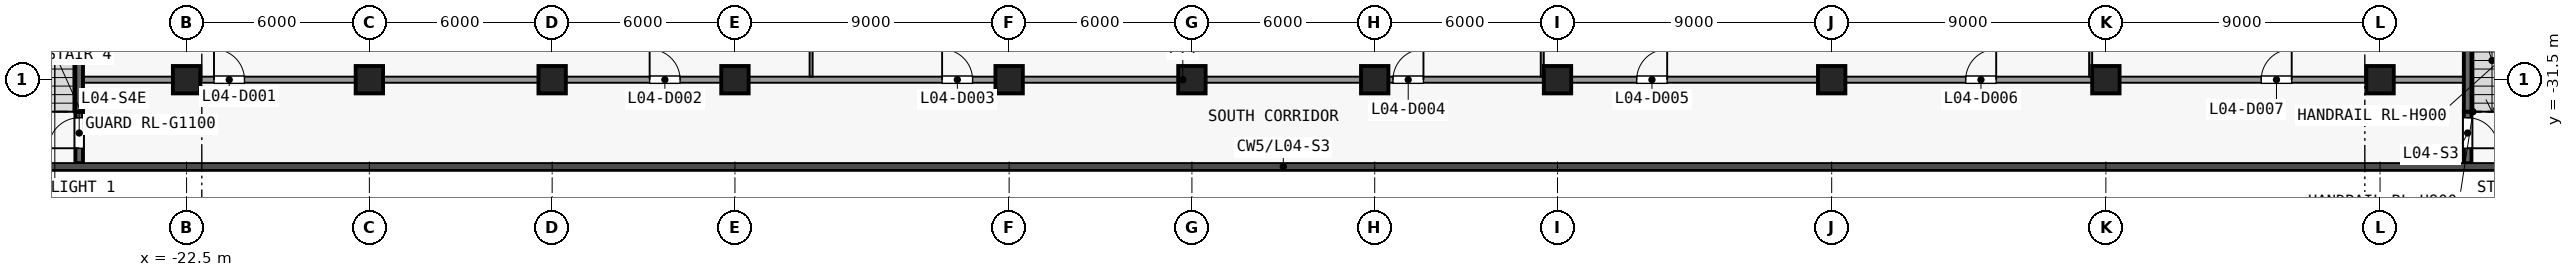
"""IFC4 building model, lengths in metres.
Left out: names, types, materials, properties, quantities, classifications, styles, units other than length and angle.
Written with IfcOpenShell. Run it as: python <this file> out.ifc"""

import sys

from ifc_helpers import new_model, si_unit, direction, frame, frame_2d, origin, origin_2d, place, context, subcontext, project, spatial, rectangle, extrude, element, fill, save


model = new_model("IFC4")
c1 = context("Model", 3, precision=1e-05, world=origin(), true_north=direction((0.0, 1.0)))
c2 = subcontext(c1, "Body", "Model", "MODEL_VIEW")
j1 = project(units=[si_unit("LENGTHUNIT", "METRE"), si_unit("PLANEANGLEUNIT", "RADIAN")], contexts=[c1])
p1 = place(None, origin())
s1 = spatial("IfcSite", under=j1, at=p1, CompositionType="ELEMENT")
p2 = place(p1, origin())
s2 = spatial("IfcBuilding", under=s1, at=p2, CompositionType="ELEMENT")
p3 = place(p2, frame((0.0, 0.0, 23.5)))
s3 = spatial("IfcBuildingStorey", under=s2, at=p3, CompositionType="ELEMENT", Elevation=23.5)
for number, where, z_axis, x_axis in (
    (1, (-22.5, -31.5, 0.0), (0.0, 0.0, 1.0), (1.0, 0.0, 0.0)),
    (2, (-16.5, -31.5, 0.0), (0.0, 0.0, 1.0), (1.0, 0.0, 0.0)),
    (3, (-10.5, -31.5, 0.0), (0.0, 0.0, 1.0), (1.0, 0.0, 0.0)),
    (4, (-4.5, -31.5, 0.0), (0.0, 0.0, 1.0), (1.0, 0.0, 0.0)),
    (5, (4.5, -31.5, 0.0), (0.0, 0.0, 1.0), (1.0, 0.0, 0.0)),
    (6, (10.5, -31.5, 0.0), (0.0, 0.0, 1.0), (1.0, 0.0, 0.0)),
    (7, (16.5, -31.5, 0.0), (0.0, 0.0, 1.0), (1.0, 0.0, 0.0)),
    (8, (22.5, -31.5, 0.0), (0.0, 0.0, 1.0), (1.0, 0.0, 0.0)),
    (9, (31.5, -31.5, 0.0), (0.0, 0.0, 1.0), (1.0, 0.0, 0.0)),
    (10, (40.5, -31.5, 0.0), (0.0, 0.0, 1.0), (1.0, 0.0, 0.0)),
    (11, (49.5, -31.5, 0.0), (0.0, 0.0, 1.0), (1.0, 0.0, 0.0)),
):
    element("IfcColumn", number, at=place(p3, frame(where, z_axis=z_axis, x_axis=x_axis)), inside=s3, PredefinedType="COLUMN", context=c2, shape_type="SweptSolid", body=[
        extrude(rectangle(XDim=0.9, YDim=0.9, at=origin_2d()), origin(), (0.0, 0.0, 1.0), 4.5),
    ])
p4 = place(p3, frame((52.375, -32.55, 0.0), z_axis=(0.0, 0.0, 1.0), x_axis=(0.0, -1.0, 0.0)))
e12 = element("IfcWall", 12, at=p4, inside=s3, PredefinedType="SHEAR", context=c2, shape_type="SweptSolid", body=[
    extrude(rectangle(XDim=1.69, YDim=0.25, at=frame_2d((0.845, 0.0))), origin(), (0.0, 0.0, 1.0), 4.15),
])
p5 = place(p4, frame((0.2, 0.0, 0.0)))
e13 = element("IfcOpeningElement", 13, at=p5, cuts=e12, PredefinedType="OPENING", context=c2, shape_type="SweptSolid", body=[
    extrude(rectangle(XDim=1.0, YDim=2.1, at=frame_2d((0.5, 1.05))), frame((0.0, 0.135, 0.0), z_axis=(0.0, -1.0, 0.0), x_axis=(1.0, 0.0, 0.0)), (0.0, 0.0, 1.0), 0.27),
])
p6 = place(p3, frame((52.375, -32.55, 0.0), z_axis=(0.0, 0.0, 1.0), x_axis=(0.0, 1.0, 0.0)))
e14 = element("IfcWall", 14, at=p6, inside=s3, PredefinedType="SHEAR", context=c2, shape_type="SweptSolid", body=[
    extrude(rectangle(XDim=5.48, YDim=0.25, at=frame_2d((2.74, 0.0))), origin(), (0.0, 0.0, 1.0), 4.15),
])
p7 = place(p3, frame((-26.025, -34.24, 0.0), z_axis=(0.0, 0.0, 1.0), x_axis=(0.0, 1.0, 0.0)))
e15 = element("IfcWall", 15, at=p7, inside=s3, PredefinedType="SHEAR", context=c2, shape_type="SweptSolid", body=[
    extrude(rectangle(XDim=1.69, YDim=0.25, at=frame_2d((0.845, 0.0))), origin(), (0.0, 0.0, 1.0), 4.15),
])
p8 = place(p7, frame((0.49, 0.0, 0.0)))
e16 = element("IfcOpeningElement", 16, at=p8, cuts=e15, PredefinedType="OPENING", context=c2, shape_type="SweptSolid", body=[
    extrude(rectangle(XDim=1.0, YDim=2.1, at=frame_2d((0.5, 1.05))), frame((0.0, 0.135, 0.0), z_axis=(0.0, -1.0, 0.0), x_axis=(1.0, 0.0, 0.0)), (0.0, 0.0, 1.0), 0.27),
])
p9 = place(p3, frame((-26.025, -32.55, 0.0), z_axis=(0.0, 0.0, 1.0), x_axis=(0.0, 1.0, 0.0)))
e17 = element("IfcWall", 17, at=p9, inside=s3, PredefinedType="SHEAR", context=c2, shape_type="SweptSolid", body=[
    extrude(rectangle(XDim=5.48, YDim=0.25, at=frame_2d((2.74, 0.0))), origin(), (0.0, 0.0, 1.0), 4.15),
])
p10 = place(p3, frame((-25.9, -31.5, 0.0), z_axis=(0.0, 0.0, 1.0), x_axis=(1.0, 0.0, 0.0)))
e18 = element("IfcWall", 18, at=p10, inside=s3, PredefinedType="PARTITIONING", context=c2, shape_type="SweptSolid", body=[
    extrude(rectangle(XDim=78.15, YDim=0.2, at=frame_2d((39.075, 0.0))), origin(), (0.0, 0.0, 1.0), 4.15),
])
p11 = place(p10, frame((4.3, 0.0, 0.0)))
e19 = element("IfcOpeningElement", 19, at=p11, cuts=e18, PredefinedType="OPENING", context=c2, shape_type="SweptSolid", body=[
    extrude(rectangle(XDim=1.0, YDim=2.1, at=frame_2d((0.5, 1.05))), frame((0.0, 0.11, 0.0), z_axis=(0.0, -1.0, 0.0), x_axis=(1.0, 0.0, 0.0)), (0.0, 0.0, 1.0), 0.22),
])
p12 = place(p10, frame((18.6, 0.0, 0.0)))
e20 = element("IfcOpeningElement", 20, at=p12, cuts=e18, PredefinedType="OPENING", context=c2, shape_type="SweptSolid", body=[
    extrude(rectangle(XDim=1.0, YDim=2.1, at=frame_2d((0.5, 1.05))), frame((0.0, 0.11, 0.0), z_axis=(0.0, -1.0, 0.0), x_axis=(1.0, 0.0, 0.0)), (0.0, 0.0, 1.0), 0.22),
])
p13 = place(p10, frame((28.2, 0.0, 0.0)))
e21 = element("IfcOpeningElement", 21, at=p13, cuts=e18, PredefinedType="OPENING", context=c2, shape_type="SweptSolid", body=[
    extrude(rectangle(XDim=1.0, YDim=2.1, at=frame_2d((0.5, 1.05))), frame((0.0, 0.11, 0.0), z_axis=(0.0, -1.0, 0.0), x_axis=(1.0, 0.0, 0.0)), (0.0, 0.0, 1.0), 0.22),
])
p14 = place(p10, frame((43.0, 0.0, 0.0)))
e22 = element("IfcOpeningElement", 22, at=p14, cuts=e18, PredefinedType="OPENING", context=c2, shape_type="SweptSolid", body=[
    extrude(rectangle(XDim=1.0, YDim=2.1, at=frame_2d((0.5, 1.05))), frame((0.0, 0.11, 0.0), z_axis=(0.0, -1.0, 0.0), x_axis=(1.0, 0.0, 0.0)), (0.0, 0.0, 1.0), 0.22),
])
p15 = place(p10, frame((51.0, 0.0, 0.0)))
e23 = element("IfcOpeningElement", 23, at=p15, cuts=e18, PredefinedType="OPENING", context=c2, shape_type="SweptSolid", body=[
    extrude(rectangle(XDim=1.0, YDim=2.1, at=frame_2d((0.5, 1.05))), frame((0.0, 0.11, 0.0), z_axis=(0.0, -1.0, 0.0), x_axis=(1.0, 0.0, 0.0)), (0.0, 0.0, 1.0), 0.22),
])
p16 = place(p10, frame((61.8, 0.0, 0.0)))
e24 = element("IfcOpeningElement", 24, at=p16, cuts=e18, PredefinedType="OPENING", context=c2, shape_type="SweptSolid", body=[
    extrude(rectangle(XDim=1.0, YDim=2.1, at=frame_2d((0.5, 1.05))), frame((0.0, 0.11, 0.0), z_axis=(0.0, -1.0, 0.0), x_axis=(1.0, 0.0, 0.0)), (0.0, 0.0, 1.0), 0.22),
])
p17 = place(p10, frame((71.5, 0.0, 0.0)))
e25 = element("IfcOpeningElement", 25, at=p17, cuts=e18, PredefinedType="OPENING", context=c2, shape_type="SweptSolid", body=[
    extrude(rectangle(XDim=1.0, YDim=2.1, at=frame_2d((0.5, 1.05))), frame((0.0, 0.11, 0.0), z_axis=(0.0, -1.0, 0.0), x_axis=(1.0, 0.0, 0.0)), (0.0, 0.0, 1.0), 0.22),
])
p18 = place(p3, frame((-2.0, -31.4, 0.0), z_axis=(0.0, 0.0, 1.0), x_axis=(0.0, 1.0, 0.0)))
e26 = element("IfcWall", 26, at=p18, inside=s3, PredefinedType="PARTITIONING", context=c2, shape_type="SweptSolid", body=[
    extrude(rectangle(XDim=5.9, YDim=0.1, at=frame_2d((2.95, 0.0))), origin(), (0.0, 0.0, 1.0), 4.15),
])
p19 = place(p3, frame((22.0, -31.4, 0.0), z_axis=(0.0, 0.0, 1.0), x_axis=(0.0, 1.0, 0.0)))
e27 = element("IfcWall", 27, at=p19, inside=s3, PredefinedType="PARTITIONING", context=c2, shape_type="SweptSolid", body=[
    extrude(rectangle(XDim=8.8, YDim=0.1, at=frame_2d((4.4, 0.0))), origin(), (0.0, 0.0, 1.0), 4.15),
])
p20 = place(p3, frame((40.0, -31.4, 0.0), z_axis=(0.0, 0.0, 1.0), x_axis=(0.0, 1.0, 0.0)))
e28 = element("IfcWall", 28, at=p20, inside=s3, PredefinedType="PARTITIONING", context=c2, shape_type="SweptSolid", body=[
    extrude(rectangle(XDim=8.85, YDim=0.1, at=frame_2d((4.425, 0.0))), origin(), (0.0, 0.0, 1.0), 4.15),
])
p21 = place(p5, origin())
e29 = element("IfcDoor", 29, at=p21, inside=s3, OperationType="SINGLE_SWING_RIGHT", PredefinedType="DOOR", context=c2, shape_type="SweptSolid", body=[
    extrude(rectangle(XDim=1.0, YDim=2.1, at=frame_2d((0.5, 1.05))), frame((0.0, 0.025, 0.0), z_axis=(0.0, -1.0, 0.0), x_axis=(1.0, 0.0, 0.0)), (0.0, 0.0, 1.0), 0.05),
])
fill(e13, e29)
p22 = place(p8, origin())
e30 = element("IfcDoor", 30, at=p22, inside=s3, OperationType="SINGLE_SWING_LEFT", PredefinedType="DOOR", context=c2, shape_type="SweptSolid", body=[
    extrude(rectangle(XDim=1.0, YDim=2.1, at=frame_2d((0.5, 1.05))), frame((0.0, 0.025, 0.0), z_axis=(0.0, -1.0, 0.0), x_axis=(1.0, 0.0, 0.0)), (0.0, 0.0, 1.0), 0.05),
])
fill(e16, e30)
p23 = place(p11, origin())
e31 = element("IfcDoor", 31, at=p23, inside=s3, OperationType="SINGLE_SWING_RIGHT", PredefinedType="DOOR", context=c2, shape_type="SweptSolid", body=[
    extrude(rectangle(XDim=1.0, YDim=2.1, at=frame_2d((0.5, 1.05))), frame((0.0, 0.025, 0.0), z_axis=(0.0, -1.0, 0.0), x_axis=(1.0, 0.0, 0.0)), (0.0, 0.0, 1.0), 0.05),
])
fill(e19, e31)
p24 = place(p12, origin())
e32 = element("IfcDoor", 32, at=p24, inside=s3, OperationType="SINGLE_SWING_RIGHT", PredefinedType="DOOR", context=c2, shape_type="SweptSolid", body=[
    extrude(rectangle(XDim=1.0, YDim=2.1, at=frame_2d((0.5, 1.05))), frame((0.0, 0.025, 0.0), z_axis=(0.0, -1.0, 0.0), x_axis=(1.0, 0.0, 0.0)), (0.0, 0.0, 1.0), 0.05),
])
fill(e20, e32)
p25 = place(p13, origin())
e33 = element("IfcDoor", 33, at=p25, inside=s3, OperationType="SINGLE_SWING_RIGHT", PredefinedType="DOOR", context=c2, shape_type="SweptSolid", body=[
    extrude(rectangle(XDim=1.0, YDim=2.1, at=frame_2d((0.5, 1.05))), frame((0.0, 0.025, 0.0), z_axis=(0.0, -1.0, 0.0), x_axis=(1.0, 0.0, 0.0)), (0.0, 0.0, 1.0), 0.05),
])
fill(e21, e33)
p26 = place(p14, origin())
e34 = element("IfcDoor", 34, at=p26, inside=s3, OperationType="SINGLE_SWING_LEFT", PredefinedType="DOOR", context=c2, shape_type="SweptSolid", body=[
    extrude(rectangle(XDim=1.0, YDim=2.1, at=frame_2d((0.5, 1.05))), frame((0.0, 0.025, 0.0), z_axis=(0.0, -1.0, 0.0), x_axis=(1.0, 0.0, 0.0)), (0.0, 0.0, 1.0), 0.05),
])
fill(e22, e34)
p27 = place(p15, origin())
e35 = element("IfcDoor", 35, at=p27, inside=s3, OperationType="SINGLE_SWING_LEFT", PredefinedType="DOOR", context=c2, shape_type="SweptSolid", body=[
    extrude(rectangle(XDim=1.0, YDim=2.1, at=frame_2d((0.5, 1.05))), frame((0.0, 0.025, 0.0), z_axis=(0.0, -1.0, 0.0), x_axis=(1.0, 0.0, 0.0)), (0.0, 0.0, 1.0), 0.05),
])
fill(e23, e35)
p28 = place(p16, origin())
e36 = element("IfcDoor", 36, at=p28, inside=s3, OperationType="SINGLE_SWING_LEFT", PredefinedType="DOOR", context=c2, shape_type="SweptSolid", body=[
    extrude(rectangle(XDim=1.0, YDim=2.1, at=frame_2d((0.5, 1.05))), frame((0.0, 0.025, 0.0), z_axis=(0.0, -1.0, 0.0), x_axis=(1.0, 0.0, 0.0)), (0.0, 0.0, 1.0), 0.05),
])
fill(e24, e36)
p29 = place(p17, origin())
e37 = element("IfcDoor", 37, at=p29, inside=s3, OperationType="SINGLE_SWING_LEFT", PredefinedType="DOOR", context=c2, shape_type="SweptSolid", body=[
    extrude(rectangle(XDim=1.0, YDim=2.1, at=frame_2d((0.5, 1.05))), frame((0.0, 0.025, 0.0), z_axis=(0.0, -1.0, 0.0), x_axis=(1.0, 0.0, 0.0)), (0.0, 0.0, 1.0), 0.05),
])
fill(e25, e37)
save(model, sys.argv[1])
